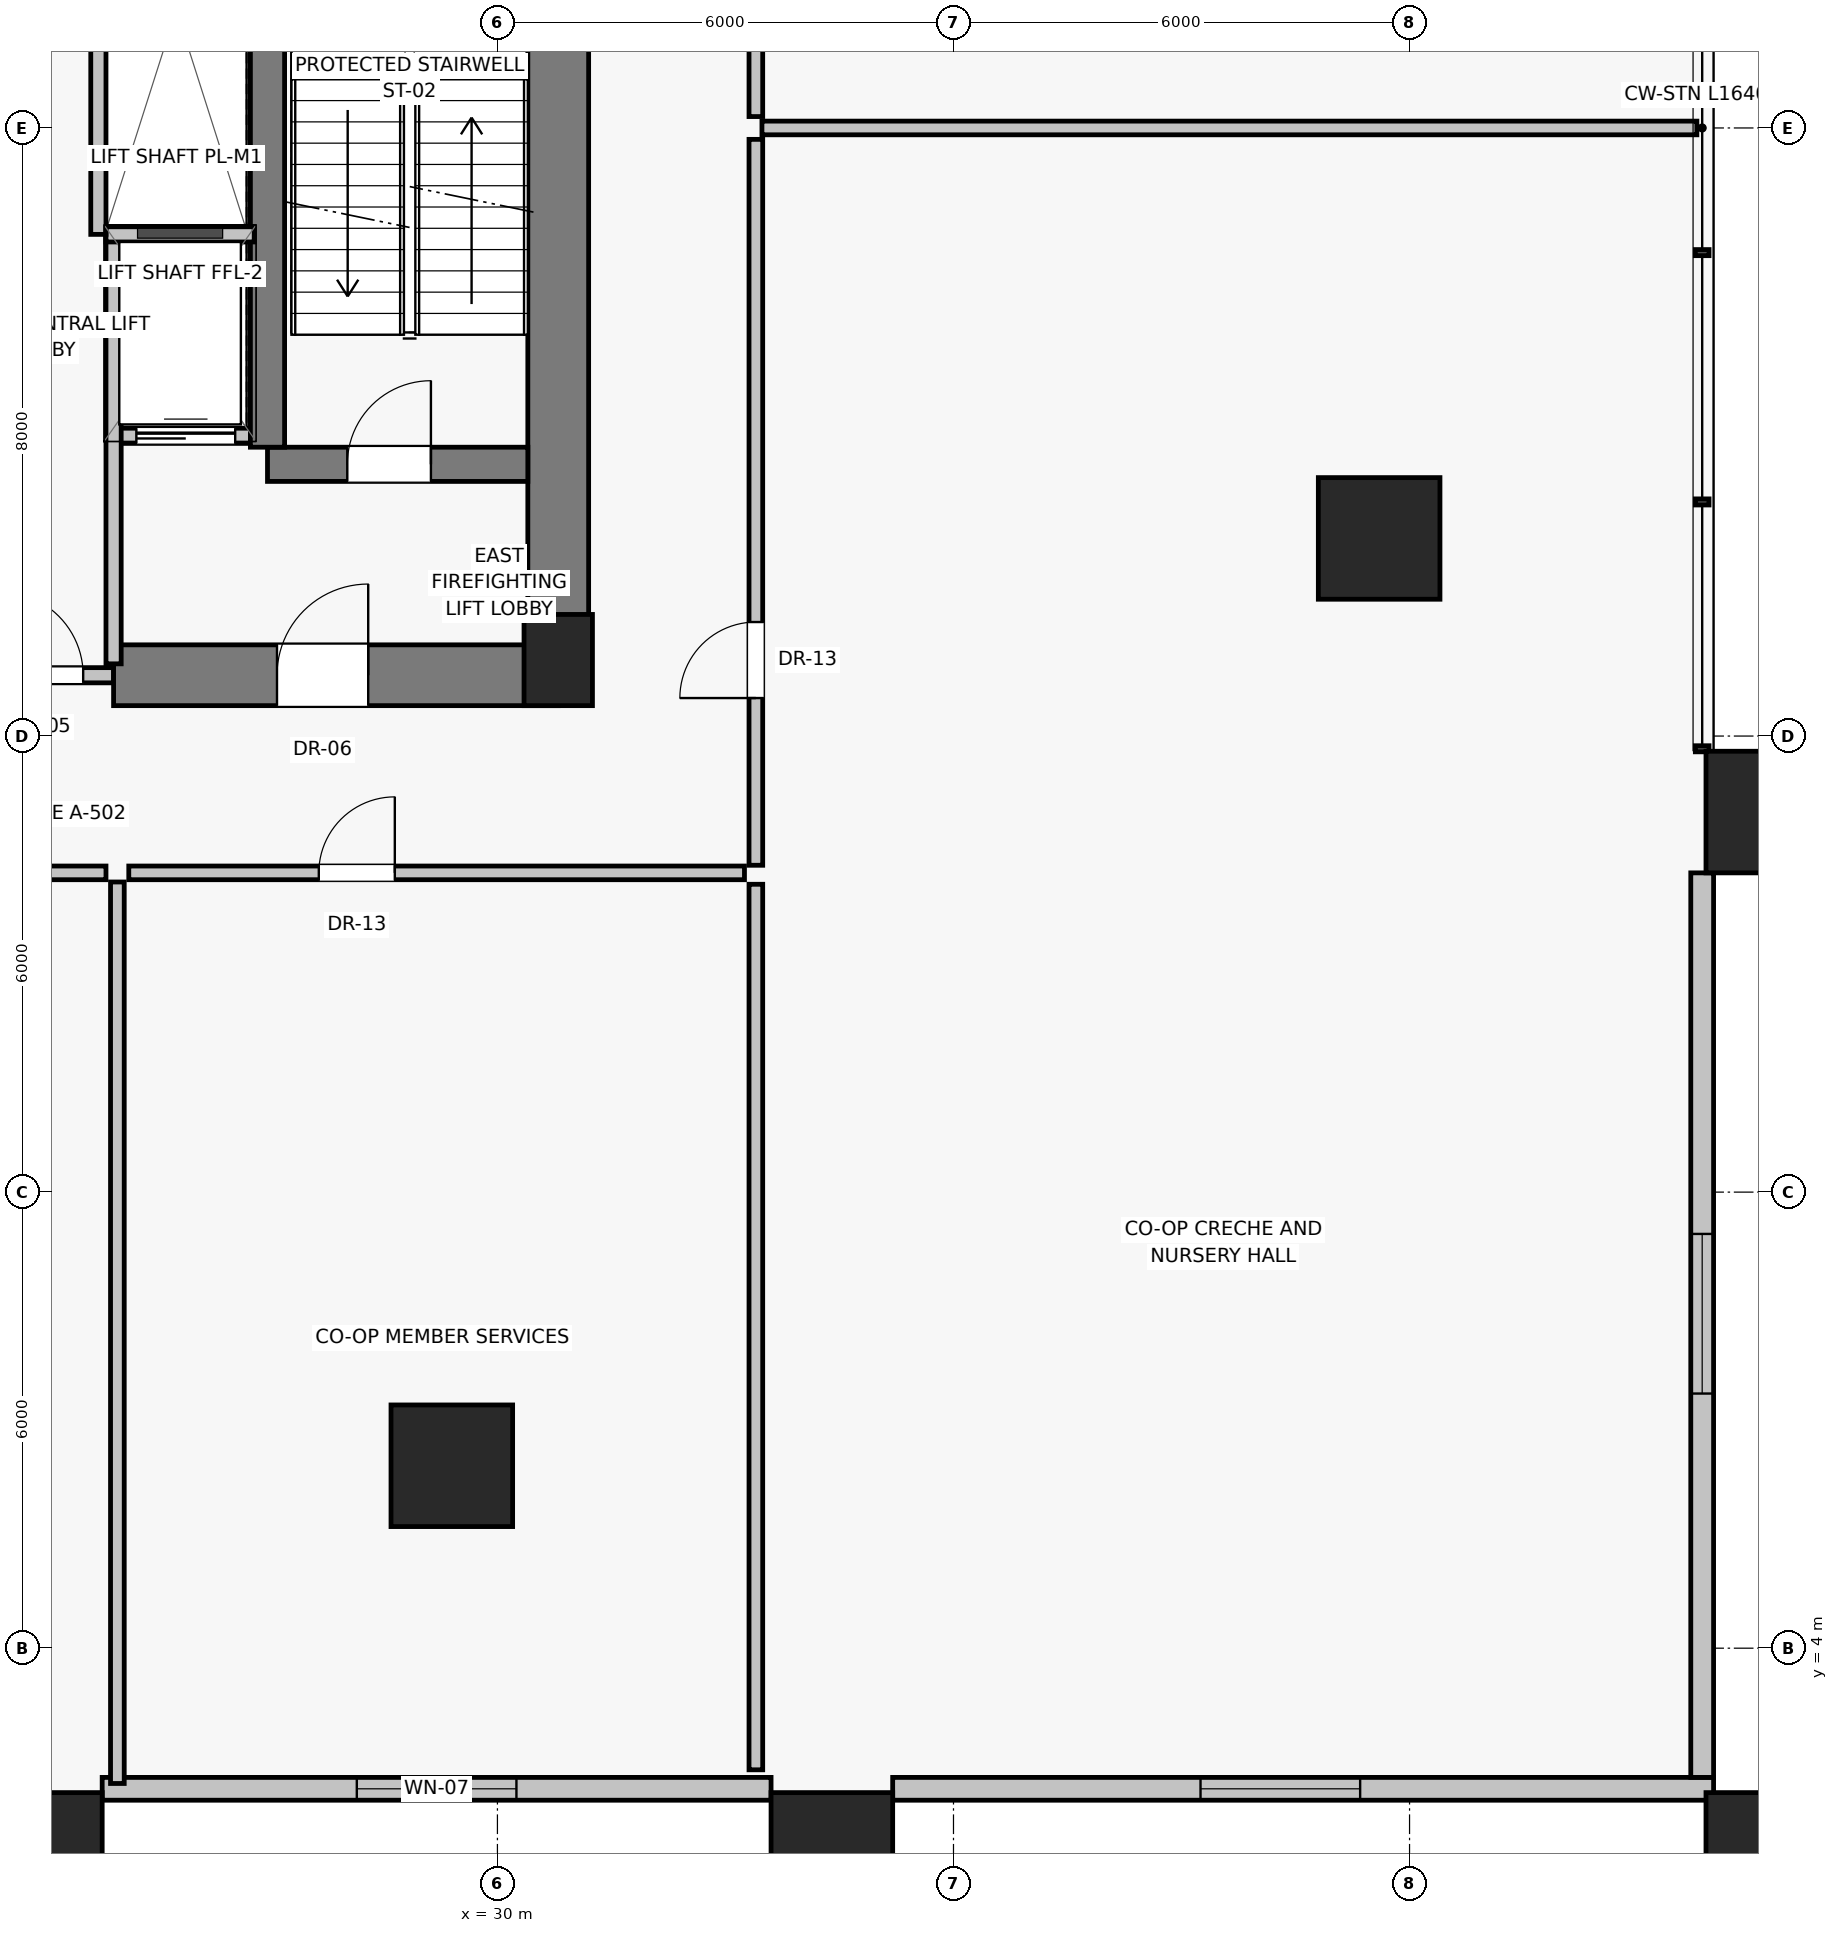
"""IFC4 building model, lengths in metres.
Left out: names, types, materials, properties, quantities, classifications, styles, units other than length and angle.
Written with IfcOpenShell. Run it as: python <this file> out.ifc"""

import sys

from ifc_helpers import new_model, si_unit, direction, frame, frame_2d, origin, origin_2d, place, context, subcontext, project, spatial, rectangle, extrude, source, transform, mapped, element, fill, save


model = new_model("IFC4")
c1 = context("Model", 3, precision=1e-05, world=origin(), true_north=direction((0.0, 1.0)))
c2 = subcontext(c1, "Body", "Model", "MODEL_VIEW")
j1 = project(units=[si_unit("LENGTHUNIT", "METRE"), si_unit("PLANEANGLEUNIT", "RADIAN")], contexts=[c1])
p1 = place(None, origin())
s1 = spatial("IfcSite", under=j1, at=p1, CompositionType="ELEMENT")
p2 = place(p1, origin())
s2 = spatial("IfcBuilding", under=s1, at=p2, CompositionType="ELEMENT")
p3 = place(p2, frame((0.0, 0.0, 5.2)))
s3 = spatial("IfcBuildingStorey", under=s2, at=p3, CompositionType="ELEMENT", Elevation=5.2)
p4 = place(p3, frame((30.8, 17.0, 0.0), z_axis=(0.0, 0.0, 1.0), x_axis=(1.0, 0.0, 0.0)))
e1 = element("IfcColumn", 1, at=p4, inside=s3, PredefinedType="PILASTER", context=c2, shape_type="SweptSolid", body=[
    extrude(rectangle(XDim=0.9, YDim=1.2, at=origin_2d()), origin(), (0.0, 0.0, 1.0), 4.4),
])
for number, where, z_axis, x_axis in (
    (2, (24.0, 1.3, 0.0), (0.0, 0.0, 1.0), (1.0, 0.0, 0.0)),
    (3, (34.4, 1.3, 0.0), (0.0, 0.0, 1.0), (1.0, 0.0, 0.0)),
    (4, (46.7, 1.3, 0.0), (0.0, 0.0, 1.0), (1.0, 0.0, 0.0)),
    (5, (46.7, 15.0, 0.0), (0.0, 0.0, 1.0), (1.0, 0.0, 0.0)),
    (6, (41.6, 18.6, 0.0), (0.0, 0.0, 1.0), (1.0, 0.0, 0.0)),
    (7, (29.4, 6.4, 0.0), (0.0, 0.0, 1.0), (1.0, 0.0, 0.0)),
):
    element("IfcColumn", number, at=place(p3, frame(where, z_axis=z_axis, x_axis=x_axis)), inside=s3, PredefinedType="COLUMN", context=c2, shape_type="SweptSolid", body=[
        extrude(rectangle(XDim=1.6, YDim=1.6, at=origin_2d()), origin(), (0.0, 0.0, 1.0), 4.4),
    ])
p5 = place(p3, frame((24.8, 2.15, 0.0), z_axis=(0.0, 0.0, 1.0), x_axis=(1.0, 0.0, 0.0)))
e8 = element("IfcWall", 8, at=p5, inside=s3, PredefinedType="SOLIDWALL", context=c2, shape_type="SweptSolid", body=[
    extrude(rectangle(XDim=8.8, YDim=0.3, at=frame_2d((4.4, 0.0))), origin(), (0.0, 0.0, 1.0), 3.0),
])
p6 = place(p5, frame((3.35, 0.0, 0.85)))
e9 = element("IfcOpeningElement", 9, at=p6, cuts=e8, PredefinedType="OPENING", context=c2, shape_type="SweptSolid", body=[
    extrude(rectangle(XDim=2.1, YDim=1.75, at=frame_2d((1.05, 0.875))), frame((0.0, 0.16, 0.0), z_axis=(0.0, -1.0, 0.0), x_axis=(1.0, 0.0, 0.0)), (0.0, 0.0, 1.0), 0.32),
])
p7 = place(p3, frame((35.2, 2.15, 0.0), z_axis=(0.0, 0.0, 1.0), x_axis=(1.0, 0.0, 0.0)))
e10 = element("IfcWall", 10, at=p7, inside=s3, PredefinedType="SOLIDWALL", context=c2, shape_type="SweptSolid", body=[
    extrude(rectangle(XDim=10.8, YDim=0.3, at=frame_2d((5.4, 0.0))), origin(), (0.0, 0.0, 1.0), 3.0),
])
p8 = place(p7, frame((4.05, 0.0, 0.85)))
e11 = element("IfcOpeningElement", 11, at=p8, cuts=e10, PredefinedType="OPENING", context=c2, shape_type="SweptSolid", body=[
    extrude(rectangle(XDim=2.1, YDim=1.75, at=frame_2d((1.05, 0.875))), frame((0.0, 0.16, 0.0), z_axis=(0.0, -1.0, 0.0), x_axis=(1.0, 0.0, 0.0)), (0.0, 0.0, 1.0), 0.32),
])
p9 = place(p3, frame((45.85, 2.3, 0.0), z_axis=(0.0, 0.0, 1.0), x_axis=(0.0, 1.0, 0.0)))
e12 = element("IfcWall", 12, at=p9, inside=s3, PredefinedType="SOLIDWALL", context=c2, shape_type="SweptSolid", body=[
    extrude(rectangle(XDim=11.9, YDim=0.3, at=frame_2d((5.95, 0.0))), origin(), (0.0, 0.0, 1.0), 3.0),
])
p10 = place(p9, frame((5.05, 0.0, 0.85)))
e13 = element("IfcOpeningElement", 13, at=p10, cuts=e12, PredefinedType="OPENING", context=c2, shape_type="SweptSolid", body=[
    extrude(rectangle(XDim=2.1, YDim=1.75, at=frame_2d((1.05, 0.875))), frame((0.0, 0.16, 0.0), z_axis=(0.0, -1.0, 0.0), x_axis=(1.0, 0.0, 0.0)), (0.0, 0.0, 1.0), 0.32),
])
p11 = place(p3, frame((30.8, 16.8, 0.0), z_axis=(0.0, 0.0, 1.0), x_axis=(0.0, 1.0, 0.0)))
e14 = element("IfcWall", 14, at=p11, inside=s3, PredefinedType="SHEAR", context=c2, shape_type="SweptSolid", body=[
    extrude(rectangle(XDim=14.2, YDim=0.8, at=frame_2d((7.1, 0.0))), origin(), (0.0, 0.0, 1.0), 4.1),
])
p12 = place(p3, frame((23.05, 16.8, 0.0), z_axis=(0.0, 0.0, 1.0), x_axis=(1.0, 0.0, 0.0)))
e15 = element("IfcWall", 15, at=p12, inside=s3, PredefinedType="SOLIDWALL", context=c2, shape_type="SweptSolid", body=[
    extrude(rectangle(XDim=1.9, YDim=0.2, at=frame_2d((0.95, 0.0))), origin(), (0.0, 0.0, 1.0), 3.25),
])
p13 = place(p12, frame((0.4, 0.0, 0.0)))
e16 = element("IfcOpeningElement", 16, at=p13, cuts=e15, PredefinedType="OPENING", context=c2, shape_type="SweptSolid", body=[
    extrude(rectangle(XDim=1.1, YDim=2.03, at=frame_2d((0.55, 1.015))), frame((0.0, 0.11, 0.0), z_axis=(0.0, -1.0, 0.0), x_axis=(1.0, 0.0, 0.0)), (0.0, 0.0, 1.0), 0.22),
])
p14 = place(p3, frame((24.95, 16.8, 0.0), z_axis=(0.0, 0.0, 1.0), x_axis=(1.0, 0.0, 0.0)))
e17 = element("IfcWall", 17, at=p14, inside=s3, PredefinedType="SHEAR", context=c2, shape_type="SweptSolid", body=[
    extrude(rectangle(XDim=5.85, YDim=0.8, at=frame_2d((2.925, 0.0))), origin(), (0.0, 0.0, 1.0), 4.1),
])
p15 = place(p14, frame((2.15, 0.0, 0.0)))
e18 = element("IfcOpeningElement", 18, at=p15, cuts=e17, PredefinedType="OPENING", context=c2, shape_type="SweptSolid", body=[
    extrude(rectangle(XDim=1.2, YDim=2.03, at=frame_2d((0.6, 1.015))), frame((0.0, 0.41, 0.0), z_axis=(0.0, -1.0, 0.0), x_axis=(1.0, 0.0, 0.0)), (0.0, 0.0, 1.0), 0.82),
])
p16 = place(p3, frame((24.95, 19.95, 0.0), z_axis=(0.0, 0.0, 1.0), x_axis=(1.0, 0.0, 0.0)))
e19 = element("IfcWall", 19, at=p16, inside=s3, PredefinedType="SOLIDWALL", context=c2, shape_type="SweptSolid", body=[
    extrude(rectangle(XDim=1.85, YDim=0.2, at=frame_2d((0.925, 0.0))), origin(), (0.0, 0.0, 1.0), 4.1),
])
p17 = place(p16, frame((0.3, 0.0, 0.0)))
e20 = element("IfcOpeningElement", 20, at=p17, cuts=e19, PredefinedType="OPENING", context=c2, shape_type="SweptSolid", body=[
    extrude(rectangle(XDim=1.3, YDim=2.25, at=frame_2d((0.65, 1.125))), frame((0.0, 0.11, 0.0), z_axis=(0.0, -1.0, 0.0), x_axis=(1.0, 0.0, 0.0)), (0.0, 0.0, 1.0), 0.22),
])
p18 = place(p3, frame((26.975, 19.575, 0.0), z_axis=(0.0, 0.0, 1.0), x_axis=(1.0, 0.0, 0.0)))
e21 = element("IfcWall", 21, at=p18, inside=s3, PredefinedType="SHEAR", context=c2, shape_type="SweptSolid", body=[
    extrude(rectangle(XDim=3.425, YDim=0.45, at=frame_2d((1.712, 0.0))), origin(), (0.0, 0.0, 1.0), 4.1),
])
p19 = place(p18, frame((1.05, 0.0, 0.0)))
e22 = element("IfcOpeningElement", 22, at=p19, cuts=e21, PredefinedType="OPENING", context=c2, shape_type="SweptSolid", body=[
    extrude(rectangle(XDim=1.1, YDim=2.03, at=frame_2d((0.55, 1.015))), frame((0.0, 0.235, 0.0), z_axis=(0.0, -1.0, 0.0), x_axis=(1.0, 0.0, 0.0)), (0.0, 0.0, 1.0), 0.47),
])
p20 = place(p3, frame((26.975, 19.8, 0.0), z_axis=(0.0, 0.0, 1.0), x_axis=(0.0, 1.0, 0.0)))
e23 = element("IfcWall", 23, at=p20, inside=s3, PredefinedType="SHEAR", context=c2, shape_type="SweptSolid", body=[
    extrude(rectangle(XDim=8.825, YDim=0.45, at=frame_2d((4.413, 0.0))), origin(), (0.0, 0.0, 1.0), 4.1),
])
p21 = place(p3, frame((24.95, 16.95, 0.0), z_axis=(0.0, 0.0, 1.0), x_axis=(0.0, 1.0, 0.0)))
e24 = element("IfcWall", 24, at=p21, inside=s3, PredefinedType="SOLIDWALL", context=c2, shape_type="SweptSolid", body=[
    extrude(rectangle(XDim=5.6, YDim=0.2, at=frame_2d((2.8, 0.0))), origin(), (0.0, 0.0, 1.0), 4.1),
])
p22 = place(p3, frame((24.85, 22.6, 0.0), z_axis=(0.0, 0.0, 1.0), x_axis=(1.0, 0.0, 0.0)))
e25 = element("IfcWall", 25, at=p22, inside=s3, PredefinedType="SOLIDWALL", context=c2, shape_type="SweptSolid", body=[
    extrude(rectangle(XDim=1.95, YDim=0.2, at=frame_2d((0.975, 0.0))), origin(), (0.0, 0.0, 1.0), 4.1),
])
p23 = place(p3, frame((24.75, 22.6, 0.0), z_axis=(0.0, 0.0, 1.0), x_axis=(0.0, 1.0, 0.0)))
e26 = element("IfcWall", 26, at=p23, inside=s3, PredefinedType="SOLIDWALL", context=c2, shape_type="SweptSolid", body=[
    extrude(rectangle(XDim=5.95, YDim=0.2, at=frame_2d((2.975, 0.0))), origin(), (0.0, 0.0, 1.0), 4.1),
])
p24 = place(p3, frame((14.75, 14.2, 0.0), z_axis=(0.0, 0.0, 1.0), x_axis=(1.0, 0.0, 0.0)))
e27 = element("IfcWall", 27, at=p24, inside=s3, PredefinedType="PARTITIONING", context=c2, shape_type="SweptSolid", body=[
    extrude(rectangle(XDim=10.1, YDim=0.18, at=frame_2d((5.05, 0.0))), origin(), (0.0, 0.0, 1.0), 4.1),
])
p25 = place(p24, frame((2.5, 0.0, 0.0)))
e28 = element("IfcOpeningElement", 28, at=p25, cuts=e27, PredefinedType="OPENING", context=c2, shape_type="SweptSolid", body=[
    extrude(rectangle(XDim=1.0, YDim=2.01, at=frame_2d((0.5, 1.005))), frame((0.0, 0.1, 0.0), z_axis=(0.0, -1.0, 0.0), x_axis=(1.0, 0.0, 0.0)), (0.0, 0.0, 1.0), 0.2),
])
p26 = place(p3, frame((25.15, 14.2, 0.0), z_axis=(0.0, 0.0, 1.0), x_axis=(1.0, 0.0, 0.0)))
e29 = element("IfcWall", 29, at=p26, inside=s3, PredefinedType="PARTITIONING", context=c2, shape_type="SweptSolid", body=[
    extrude(rectangle(XDim=8.1, YDim=0.18, at=frame_2d((4.05, 0.0))), origin(), (0.0, 0.0, 1.0), 4.1),
])
p27 = place(p26, frame((2.5, 0.0, 0.0)))
e30 = element("IfcOpeningElement", 30, at=p27, cuts=e29, PredefinedType="OPENING", context=c2, shape_type="SweptSolid", body=[
    extrude(rectangle(XDim=1.0, YDim=2.01, at=frame_2d((0.5, 1.005))), frame((0.0, 0.1, 0.0), z_axis=(0.0, -1.0, 0.0), x_axis=(1.0, 0.0, 0.0)), (0.0, 0.0, 1.0), 0.2),
])
p28 = place(p3, frame((25.0, 2.22, 0.0), z_axis=(0.0, 0.0, 1.0), x_axis=(0.0, 1.0, 0.0)))
e31 = element("IfcWall", 31, at=p28, inside=s3, PredefinedType="PARTITIONING", context=c2, shape_type="SweptSolid", body=[
    extrude(rectangle(XDim=11.86, YDim=0.18, at=frame_2d((5.93, 0.0))), origin(), (0.0, 0.0, 1.0), 4.1),
])
p29 = place(p3, frame((33.4, 2.4, 0.0), z_axis=(0.0, 0.0, 1.0), x_axis=(0.0, 1.0, 0.0)))
e32 = element("IfcWall", 32, at=p29, inside=s3, PredefinedType="PARTITIONING", context=c2, shape_type="SweptSolid", body=[
    extrude(rectangle(XDim=11.65, YDim=0.18, at=frame_2d((5.825, 0.0))), origin(), (0.0, 0.0, 1.0), 4.1),
])
p30 = place(p3, frame((33.4, 14.3, 0.0), z_axis=(0.0, 0.0, 1.0), x_axis=(0.0, 1.0, 0.0)))
e33 = element("IfcWall", 33, at=p30, inside=s3, PredefinedType="PARTITIONING", context=c2, shape_type="SweptSolid", body=[
    extrude(rectangle(XDim=9.55, YDim=0.18, at=frame_2d((4.775, 0.0))), origin(), (0.0, 0.0, 1.0), 4.1),
])
p31 = place(p30, frame((2.2, 0.0, 0.0)))
e34 = element("IfcOpeningElement", 34, at=p31, cuts=e33, PredefinedType="OPENING", context=c2, shape_type="SweptSolid", body=[
    extrude(rectangle(XDim=1.0, YDim=2.01, at=frame_2d((0.5, 1.005))), frame((0.0, 0.1, 0.0), z_axis=(0.0, -1.0, 0.0), x_axis=(1.0, 0.0, 0.0)), (0.0, 0.0, 1.0), 0.2),
])
p32 = place(p3, frame((33.4, 24.15, 0.0), z_axis=(0.0, 0.0, 1.0), x_axis=(0.0, 1.0, 0.0)))
e35 = element("IfcWall", 35, at=p32, inside=s3, PredefinedType="PARTITIONING", context=c2, shape_type="SweptSolid", body=[
    extrude(rectangle(XDim=9.35, YDim=0.18, at=frame_2d((4.675, 0.0))), origin(), (0.0, 0.0, 1.0), 4.1),
])
p33 = place(p32, frame((2.2, 0.0, 0.0)))
e36 = element("IfcOpeningElement", 36, at=p33, cuts=e35, PredefinedType="OPENING", context=c2, shape_type="SweptSolid", body=[
    extrude(rectangle(XDim=1.0, YDim=2.01, at=frame_2d((0.5, 1.005))), frame((0.0, 0.1, 0.0), z_axis=(0.0, -1.0, 0.0), x_axis=(1.0, 0.0, 0.0)), (0.0, 0.0, 1.0), 0.2),
])
p34 = place(p3, frame((33.48, 24.0, 0.0), z_axis=(0.0, 0.0, 1.0), x_axis=(1.0, 0.0, 0.0)))
e37 = element("IfcWall", 37, at=p34, inside=s3, PredefinedType="PARTITIONING", context=c2, shape_type="SweptSolid", body=[
    extrude(rectangle(XDim=12.3, YDim=0.18, at=frame_2d((6.15, 0.0))), origin(), (0.0, 0.0, 1.0), 4.1),
])
m1 = source(origin(), c2, "Body", "SweptSolid", [
    extrude(rectangle(XDim=2.1, YDim=1.75, at=frame_2d((1.05, 0.875))), frame((0.0, 0.03, 0.0), z_axis=(0.0, -1.0, 0.0), x_axis=(1.0, 0.0, 0.0)), (0.0, 0.0, 1.0), 0.06),
])
p35 = place(p6, origin())
e38 = element("IfcWindow", 38, at=p35, inside=s3, PartitioningType="DOUBLE_PANEL_VERTICAL", PredefinedType="WINDOW", context=c2, shape_type="MappedRepresentation", body=[
    mapped(m1, transform((0.0, 0.0, 0.0), scale=1.0)),
])
fill(e9, e38)
p36 = place(p8, origin())
e39 = element("IfcWindow", 39, at=p36, inside=s3, PartitioningType="DOUBLE_PANEL_VERTICAL", PredefinedType="WINDOW", context=c2, shape_type="MappedRepresentation", body=[
    mapped(m1, transform((0.0, 0.0, 0.0), scale=1.0)),
])
fill(e11, e39)
p37 = place(p10, origin())
e40 = element("IfcWindow", 40, at=p37, inside=s3, PartitioningType="DOUBLE_PANEL_VERTICAL", PredefinedType="WINDOW", context=c2, shape_type="MappedRepresentation", body=[
    mapped(m1, transform((0.0, 0.0, 0.0), scale=1.0)),
])
fill(e13, e40)
m2 = source(origin(), c2, "Body", "SweptSolid", [
    extrude(rectangle(XDim=1.1, YDim=2.03, at=frame_2d((0.55, 1.015))), frame((0.0, 0.025, 0.0), z_axis=(0.0, -1.0, 0.0), x_axis=(1.0, 0.0, 0.0)), (0.0, 0.0, 1.0), 0.05),
])
p38 = place(p13, origin())
e41 = element("IfcDoor", 41, at=p38, inside=s3, OperationType="SINGLE_SWING_LEFT", PredefinedType="DOOR", context=c2, shape_type="MappedRepresentation", body=[
    mapped(m2, transform((0.0, 0.0, 0.0), scale=1.0)),
])
fill(e16, e41)
m3 = source(origin(), c2, "Body", "SweptSolid", [
    extrude(rectangle(XDim=1.2, YDim=2.03, at=frame_2d((0.6, 1.015))), frame((0.0, 0.025, 0.0), z_axis=(0.0, -1.0, 0.0), x_axis=(1.0, 0.0, 0.0)), (0.0, 0.0, 1.0), 0.05),
])
p39 = place(p15, origin())
e42 = element("IfcDoor", 42, at=p39, inside=s3, OperationType="SINGLE_SWING_RIGHT", PredefinedType="DOOR", context=c2, shape_type="MappedRepresentation", body=[
    mapped(m3, transform((0.0, 0.0, 0.0), scale=1.0)),
])
fill(e18, e42)
m4 = source(origin(), c2, "Body", "SweptSolid", [
    extrude(rectangle(XDim=1.3, YDim=2.25, at=frame_2d((0.65, 1.125))), frame((0.0, 0.025, 0.0), z_axis=(0.0, -1.0, 0.0), x_axis=(1.0, 0.0, 0.0)), (0.0, 0.0, 1.0), 0.05),
])
p40 = place(p17, origin())
e43 = element("IfcDoor", 43, at=p40, inside=s3, OperationType="SLIDING_TO_LEFT", PredefinedType="DOOR", context=c2, shape_type="MappedRepresentation", body=[
    mapped(m4, transform((0.0, 0.0, 0.0), scale=1.0)),
])
fill(e20, e43)
p41 = place(p19, origin())
e44 = element("IfcDoor", 44, at=p41, inside=s3, OperationType="SINGLE_SWING_RIGHT", PredefinedType="DOOR", context=c2, shape_type="MappedRepresentation", body=[
    mapped(m2, transform((0.0, 0.0, 0.0), scale=1.0)),
])
fill(e22, e44)
m5 = source(origin(), c2, "Body", "SweptSolid", [
    extrude(rectangle(XDim=1.0, YDim=2.01, at=frame_2d((0.5, 1.005))), frame((0.0, 0.025, 0.0), z_axis=(0.0, -1.0, 0.0), x_axis=(1.0, 0.0, 0.0)), (0.0, 0.0, 1.0), 0.05),
])
p42 = place(p27, origin())
e45 = element("IfcDoor", 45, at=p42, inside=s3, OperationType="SINGLE_SWING_RIGHT", PredefinedType="DOOR", context=c2, shape_type="MappedRepresentation", body=[
    mapped(m5, transform((0.0, 0.0, 0.0), scale=1.0)),
])
fill(e30, e45)
p43 = place(p31, origin())
e46 = element("IfcDoor", 46, at=p43, inside=s3, OperationType="SINGLE_SWING_LEFT", PredefinedType="DOOR", context=c2, shape_type="MappedRepresentation", body=[
    mapped(m5, transform((0.0, 0.0, 0.0), scale=1.0)),
])
fill(e34, e46)
save(model, sys.argv[1])
